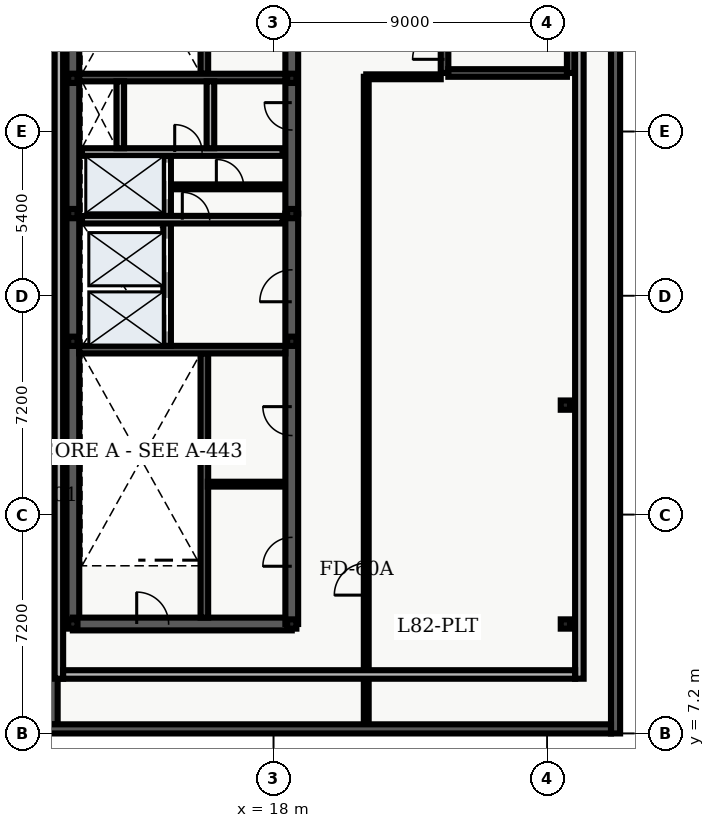
"""IFC4 building model, lengths in metres.
Left out: names, types, materials, properties, quantities, classifications, styles, units other than length and angle.
Written with IfcOpenShell. Run it as: python <this file> out.ifc"""

import sys

from ifc_helpers import new_model, entity, si_unit, converted_unit, direction, frame, origin_with_axes, origin_2d_with_axis, place, context, subcontext, project, spatial, polyline, rectangle, hollow_rectangle, outline, extrude, element, fill, save


model = new_model("IFC4")
c1 = context("Model", 3, precision=1e-05, world=origin_with_axes(), true_north=direction((0.0, 1.0)))
c2 = subcontext(c1, "Body", "Model", "MODEL_VIEW")
j1 = project(units=[si_unit("LENGTHUNIT", "METRE"), converted_unit("PLANEANGLEUNIT", "DEGREE", entity("IfcPlaneAngleMeasure", 0.017), si_unit("PLANEANGLEUNIT", "RADIAN"), dimensions=[0, 0, 0, 0, 0, 0, 0])], contexts=[c1])
p1 = place(None, origin_with_axes())
s1 = spatial("IfcSite", under=j1, at=p1, CompositionType="ELEMENT")
p2 = place(p1, origin_with_axes())
s2 = spatial("IfcBuilding", under=s1, at=p2, CompositionType="ELEMENT")
p3 = place(p2, frame((0.0, 0.0, 332.1), z_axis=(0.0, 0.0, 1.0), x_axis=(1.0, 0.0, 0.0)))
s3 = spatial("IfcBuildingStorey", under=s2, at=p3, CompositionType="ELEMENT", Elevation=332.1)
p4 = place(p3, frame((11.4, 10.8, 0.0), z_axis=(0.0, 0.0, 1.0), x_axis=(0.0, 1.0, 0.0)))
e1 = element("IfcWall", 1, at=p4, inside=s3, PredefinedType="SHEAR", context=c2, shape_type="SweptSolid", body=[
    extrude(outline(polyline([(0.0, -0.21), (27.0, -0.21), (27.0, 0.21), (0.0, 0.21), (0.0, -0.21)])), origin_with_axes(), (0.0, 0.0, 1.0), 3.64),
])
p5 = place(p3, frame((11.4, 10.8, 0.0), z_axis=(0.0, 0.0, 1.0), x_axis=(1.0, 0.0, 0.0)))
e2 = element("IfcWall", 2, at=p5, inside=s3, PredefinedType="SHEAR", context=c2, shape_type="SweptSolid", body=[
    extrude(outline(polyline([(0.0, -0.21), (7.2, -0.21), (7.2, 0.21), (0.0, 0.21), (0.0, -0.21)])), origin_with_axes(), (0.0, 0.0, 1.0), 3.64),
])
p6 = place(p5, frame((2.625, 0.0, 0.0), z_axis=(0.0, 0.0, 1.0), x_axis=(1.0, 0.0, 0.0)))
e3 = element("IfcOpeningElement", 3, at=p6, cuts=e2, PredefinedType="OPENING", context=c2, shape_type="SweptSolid", body=[
    extrude(rectangle(XDim=1.05, YDim=0.44, at=origin_2d_with_axis()), origin_with_axes(), (0.0, 0.0, 1.0), 2.15),
])
p7 = place(p3, frame((18.6, 10.8, 0.0), z_axis=(0.0, 0.0, 1.0), x_axis=(0.0, 1.0, 0.0)))
e4 = element("IfcWall", 4, at=p7, inside=s3, PredefinedType="SHEAR", context=c2, shape_type="SweptSolid", body=[
    extrude(outline(polyline([(0.0, -0.21), (13.5, -0.21), (13.5, 0.21), (0.0, 0.21), (0.0, -0.21)])), origin_with_axes(), (0.0, 0.0, 1.0), 3.64),
])
p8 = place(p7, frame((11.125, 0.0, 0.0), z_axis=(0.0, 0.0, 1.0), x_axis=(1.0, 0.0, 0.0)))
e5 = element("IfcOpeningElement", 5, at=p8, cuts=e4, PredefinedType="OPENING", context=c2, shape_type="SweptSolid", body=[
    extrude(rectangle(XDim=1.05, YDim=0.44, at=origin_2d_with_axis()), origin_with_axes(), (0.0, 0.0, 1.0), 2.15),
])
p9 = place(p7, frame((2.375, 0.0, 0.0), z_axis=(0.0, 0.0, 1.0), x_axis=(1.0, 0.0, 0.0)))
e6 = element("IfcOpeningElement", 6, at=p9, cuts=e4, PredefinedType="OPENING", context=c2, shape_type="SweptSolid", body=[
    extrude(rectangle(XDim=0.95, YDim=0.44, at=origin_2d_with_axis()), origin_with_axes(), (0.0, 0.0, 1.0), 2.15),
])
p10 = place(p7, frame((6.675, 0.0, 0.0), z_axis=(0.0, 0.0, 1.0), x_axis=(1.0, 0.0, 0.0)))
e7 = element("IfcOpeningElement", 7, at=p10, cuts=e4, PredefinedType="OPENING", context=c2, shape_type="SweptSolid", body=[
    extrude(rectangle(XDim=0.95, YDim=0.44, at=origin_2d_with_axis()), origin_with_axes(), (0.0, 0.0, 1.0), 2.15),
])
p11 = place(p3, frame((18.6, 24.3, 0.0), z_axis=(0.0, 0.0, 1.0), x_axis=(0.0, 1.0, 0.0)))
e8 = element("IfcWall", 8, at=p11, inside=s3, PredefinedType="SHEAR", context=c2, shape_type="SweptSolid", body=[
    extrude(outline(polyline([(0.0, -0.21), (13.5, -0.21), (13.5, 0.21), (0.0, 0.21), (0.0, -0.21)])), origin_with_axes(), (0.0, 0.0, 1.0), 3.64),
])
p12 = place(p11, frame((3.2, 0.0, 0.0), z_axis=(0.0, 0.0, 1.0), x_axis=(1.0, 0.0, 0.0)))
e9 = element("IfcOpeningElement", 9, at=p12, cuts=e8, PredefinedType="OPENING", context=c2, shape_type="SweptSolid", body=[
    extrude(rectangle(XDim=0.9, YDim=0.44, at=origin_2d_with_axis()), origin_with_axes(), (0.0, 0.0, 1.0), 2.15),
])
p13 = place(p11, frame((6.275, 0.0, 0.0), z_axis=(0.0, 0.0, 1.0), x_axis=(1.0, 0.0, 0.0)))
e10 = element("IfcOpeningElement", 10, at=p13, cuts=e8, PredefinedType="OPENING", context=c2, shape_type="SweptSolid", body=[
    extrude(rectangle(XDim=0.95, YDim=0.44, at=origin_2d_with_axis()), origin_with_axes(), (0.0, 0.0, 1.0), 2.15),
])
p14 = place(p11, frame((10.875, 0.0, 0.0), z_axis=(0.0, 0.0, 1.0), x_axis=(1.0, 0.0, 0.0)))
e11 = element("IfcOpeningElement", 11, at=p14, cuts=e8, PredefinedType="OPENING", context=c2, shape_type="SweptSolid", body=[
    extrude(rectangle(XDim=0.95, YDim=0.44, at=origin_2d_with_axis()), origin_with_axes(), (0.0, 0.0, 1.0), 2.15),
])
p15 = place(p3, frame((15.725, 11.01, 0.0), z_axis=(0.0, 0.0, 1.0), x_axis=(0.0, 1.0, 0.0)))
e12 = element("IfcWall", 12, at=p15, inside=s3, PredefinedType="SHEAR", context=c2, shape_type="SweptSolid", body=[
    extrude(outline(polyline([(0.0, -0.125), (8.69, -0.125), (8.69, 0.125), (0.0, 0.125), (0.0, -0.125)])), origin_with_axes(), (0.0, 0.0, 1.0), 3.64),
])
p16 = place(p3, frame((11.61, 19.825, 0.0), z_axis=(0.0, 0.0, 1.0), x_axis=(1.0, 0.0, 0.0)))
e13 = element("IfcWall", 13, at=p16, inside=s3, PredefinedType="SHEAR", context=c2, shape_type="SweptSolid", body=[
    extrude(outline(polyline([(0.0, -0.125), (6.78, -0.125), (6.78, 0.125), (0.0, 0.125), (0.0, -0.125)])), origin_with_axes(), (0.0, 0.0, 1.0), 3.64),
])
p17 = place(p3, frame((15.725, 28.9, 0.0), z_axis=(0.0, 0.0, 1.0), x_axis=(0.0, 1.0, 0.0)))
e14 = element("IfcWall", 14, at=p17, inside=s3, PredefinedType="SHEAR", context=c2, shape_type="SweptSolid", body=[
    extrude(outline(polyline([(0.0, -0.125), (8.69, -0.125), (8.69, 0.125), (0.0, 0.125), (0.0, -0.125)])), origin_with_axes(), (0.0, 0.0, 1.0), 3.64),
])
p18 = place(p3, frame((11.61, 28.775, 0.0), z_axis=(0.0, 0.0, 1.0), x_axis=(1.0, 0.0, 0.0)))
e15 = element("IfcWall", 15, at=p18, inside=s3, PredefinedType="SHEAR", context=c2, shape_type="SweptSolid", body=[
    extrude(outline(polyline([(0.0, -0.125), (6.78, -0.125), (6.78, 0.125), (0.0, 0.125), (0.0, -0.125)])), origin_with_axes(), (0.0, 0.0, 1.0), 3.64),
])
p19 = place(p3, frame((14.5, 19.95, 0.0), z_axis=(0.0, 0.0, 1.0), x_axis=(0.0, 1.0, 0.0)))
e16 = element("IfcWall", 16, at=p19, inside=s3, PredefinedType="SOLIDWALL", context=c2, shape_type="SweptSolid", body=[
    extrude(outline(polyline([(0.0, -0.125), (6.25, -0.125), (6.25, 0.125), (0.0, 0.125), (0.0, -0.125)])), origin_with_axes(), (0.0, 0.0, 1.0), 2.68),
])
p20 = place(p19, frame((1.025, 0.0, 0.0), z_axis=(0.0, 0.0, 1.0), x_axis=(1.0, 0.0, 0.0)))
e17 = element("IfcOpeningElement", 17, at=p20, cuts=e16, PredefinedType="OPENING", context=c2, shape_type="SweptSolid", body=[
    extrude(rectangle(XDim=1.1, YDim=0.27, at=origin_2d_with_axis()), origin_with_axes(), (0.0, 0.0, 1.0), 2.15),
])
p21 = place(p19, frame((2.975, 0.0, 0.0), z_axis=(0.0, 0.0, 1.0), x_axis=(1.0, 0.0, 0.0)))
e18 = element("IfcOpeningElement", 18, at=p21, cuts=e16, PredefinedType="OPENING", context=c2, shape_type="SweptSolid", body=[
    extrude(rectangle(XDim=1.1, YDim=0.27, at=origin_2d_with_axis()), origin_with_axes(), (0.0, 0.0, 1.0), 2.15),
])
p22 = place(p19, frame((5.425, 0.0, 0.0), z_axis=(0.0, 0.0, 1.0), x_axis=(1.0, 0.0, 0.0)))
e19 = element("IfcOpeningElement", 19, at=p22, cuts=e16, PredefinedType="OPENING", context=c2, shape_type="SweptSolid", body=[
    extrude(rectangle(XDim=1.2, YDim=0.27, at=origin_2d_with_axis()), origin_with_axes(), (0.0, 0.0, 1.0), 2.15),
])
p23 = place(p3, frame((11.7, 24.1, 0.0), z_axis=(0.0, 0.0, 1.0), x_axis=(1.0, 0.0, 0.0)))
e20 = element("IfcWall", 20, at=p23, inside=s3, PredefinedType="SOLIDWALL", context=c2, shape_type="SweptSolid", body=[
    extrude(outline(polyline([(0.0, -0.125), (6.6, -0.125), (6.6, 0.125), (0.0, 0.125), (0.0, -0.125)])), origin_with_axes(), (0.0, 0.0, 1.0), 2.68),
])
p24 = place(p23, frame((3.75, 0.0, 0.0), z_axis=(0.0, 0.0, 1.0), x_axis=(1.0, 0.0, 0.0)))
e21 = element("IfcOpeningElement", 21, at=p24, cuts=e20, PredefinedType="OPENING", context=c2, shape_type="SweptSolid", body=[
    extrude(rectangle(XDim=0.9, YDim=0.27, at=origin_2d_with_axis()), origin_with_axes(), (0.0, 0.0, 1.0), 2.15),
])
p25 = place(p3, frame((11.7, 26.325, 0.0), z_axis=(0.0, 0.0, 1.0), x_axis=(1.0, 0.0, 0.0)))
e22 = element("IfcWall", 22, at=p25, inside=s3, PredefinedType="SOLIDWALL", context=c2, shape_type="SweptSolid", body=[
    extrude(outline(polyline([(0.0, -0.125), (6.6, -0.125), (6.6, 0.125), (0.0, 0.125), (0.0, -0.125)])), origin_with_axes(), (0.0, 0.0, 1.0), 2.68),
])
p26 = place(p25, frame((3.5, 0.0, 0.0), z_axis=(0.0, 0.0, 1.0), x_axis=(1.0, 0.0, 0.0)))
e23 = element("IfcOpeningElement", 23, at=p26, cuts=e22, PredefinedType="OPENING", context=c2, shape_type="SweptSolid", body=[
    extrude(rectangle(XDim=0.9, YDim=0.27, at=origin_2d_with_axis()), origin_with_axes(), (0.0, 0.0, 1.0), 2.15),
])
for number, where, z_axis, x_axis in (
    (24, (12.96, 26.45, 0.0), (0.0, 0.0, 1.0), (0.0, 1.0, 0.0)),
    (25, (15.925, 26.45, 0.0), (0.0, 0.0, 1.0), (0.0, 1.0, 0.0)),
):
    element("IfcWall", number, at=place(p3, frame(where, z_axis=z_axis, x_axis=x_axis)), inside=s3, PredefinedType="SOLIDWALL", context=c2, shape_type="SweptSolid", body=[
        extrude(outline(polyline([(0.0, -0.125), (2.2, -0.125), (2.2, 0.125), (0.0, 0.125), (0.0, -0.125)])), origin_with_axes(), (0.0, 0.0, 1.0), 2.68),
    ])
p27 = place(p3, frame((23.625, 28.925, 0.0), z_axis=(0.0, 0.0, 1.0), x_axis=(0.0, 1.0, 0.0)))
e26 = element("IfcWall", 26, at=p27, inside=s3, PredefinedType="SHEAR", context=c2, shape_type="SweptSolid", body=[
    extrude(outline(polyline([(0.0, -0.125), (8.65, -0.125), (8.65, 0.125), (0.0, 0.125), (0.0, -0.125)])), origin_with_axes(), (0.0, 0.0, 1.0), 3.64),
])
p28 = place(p27, frame((0.975, 0.0, 0.0), z_axis=(0.0, 0.0, 1.0), x_axis=(1.0, 0.0, 0.0)))
e27 = element("IfcOpeningElement", 27, at=p28, cuts=e26, PredefinedType="OPENING", context=c2, shape_type="SweptSolid", body=[
    extrude(rectangle(XDim=1.05, YDim=0.27, at=origin_2d_with_axis()), origin_with_axes(), (0.0, 0.0, 1.0), 2.15),
])
p29 = place(p3, frame((27.775, 28.925, 0.0), z_axis=(0.0, 0.0, 1.0), x_axis=(0.0, 1.0, 0.0)))
e28 = element("IfcWall", 28, at=p29, inside=s3, PredefinedType="SHEAR", context=c2, shape_type="SweptSolid", body=[
    extrude(outline(polyline([(0.0, -0.125), (8.65, -0.125), (8.65, 0.125), (0.0, 0.125), (0.0, -0.125)])), origin_with_axes(), (0.0, 0.0, 1.0), 3.64),
])
p30 = place(p3, frame((23.75, 28.925, 0.0), z_axis=(0.0, 0.0, 1.0), x_axis=(1.0, 0.0, 0.0)))
e29 = element("IfcWall", 29, at=p30, inside=s3, PredefinedType="SHEAR", context=c2, shape_type="SweptSolid", body=[
    extrude(outline(polyline([(0.0, -0.125), (3.9, -0.125), (3.9, 0.125), (0.0, 0.125), (0.0, -0.125)])), origin_with_axes(), (0.0, 0.0, 1.0), 3.64),
])
for number, where, z_axis, x_axis in (
    (30, (11.4, 10.8, 0.0), (0.0, 0.0, 1.0), (1.0, 0.0, 0.0)),
    (31, (11.4, 20.1, 0.0), (0.0, 0.0, 1.0), (1.0, 0.0, 0.0)),
    (32, (11.4, 24.3, 0.0), (0.0, 0.0, 1.0), (1.0, 0.0, 0.0)),
    (33, (11.4, 28.75, 0.0), (0.0, 0.0, 1.0), (1.0, 0.0, 0.0)),
    (34, (18.6, 10.8, 0.0), (0.0, 0.0, 1.0), (1.0, 0.0, 0.0)),
    (35, (18.6, 20.1, 0.0), (0.0, 0.0, 1.0), (1.0, 0.0, 0.0)),
    (36, (18.6, 24.3, 0.0), (0.0, 0.0, 1.0), (1.0, 0.0, 0.0)),
    (37, (18.6, 28.75, 0.0), (0.0, 0.0, 1.0), (1.0, 0.0, 0.0)),
    (38, (27.6, 10.8, 0.0), (0.0, 0.0, 1.0), (1.0, 0.0, 0.0)),
    (39, (27.6, 18.0, 0.0), (0.0, 0.0, 1.0), (1.0, 0.0, 0.0)),
):
    element("IfcColumn", number, at=place(p3, frame(where, z_axis=z_axis, x_axis=x_axis)), inside=s3, PredefinedType="COLUMN", context=c2, shape_type="SweptSolid", body=[
        extrude(hollow_rectangle(XDim=0.305, YDim=0.305, WallThickness=0.015, InnerFilletRadius=0.015, OuterFilletRadius=0.03, at=origin_2d_with_axis()), origin_with_axes(), (0.0, 0.0, 1.0), 3.783),
    ])
p31 = place(p3, frame((14.62, 25.18, 0.0), z_axis=(0.0, 0.0, 1.0), x_axis=(1.0, 0.0, 0.0)))
e40 = element("IfcWall", 40, at=p31, inside=s3, PredefinedType="PARTITIONING", context=c2, shape_type="SweptSolid", body=[
    extrude(outline(polyline([(0.0, -0.08), (3.68, -0.08), (3.68, 0.08), (0.0, 0.08), (0.0, -0.08)])), origin_with_axes(), (0.0, 0.0, 1.0), 2.68),
])
p32 = place(p31, frame((1.95, 0.0, 0.0), z_axis=(0.0, 0.0, 1.0), x_axis=(1.0, 0.0, 0.0)))
e41 = element("IfcOpeningElement", 41, at=p32, cuts=e40, PredefinedType="OPENING", context=c2, shape_type="SweptSolid", body=[
    extrude(rectangle(XDim=0.9, YDim=0.18, at=origin_2d_with_axis()), origin_with_axes(), (0.0, 0.0, 1.0), 2.15),
])
p33 = place(p3, frame((15.84, 15.4, 0.0), z_axis=(0.0, 0.0, 1.0), x_axis=(1.0, 0.0, 0.0)))
e42 = element("IfcWall", 42, at=p33, inside=s3, PredefinedType="PARTITIONING", context=c2, shape_type="SweptSolid", body=[
    extrude(outline(polyline([(0.0, -0.08), (2.46, -0.08), (2.46, 0.08), (0.0, 0.08), (0.0, -0.08)])), origin_with_axes(), (0.0, 0.0, 1.0), 2.68),
])
p34 = place(p3, frame((21.05, 7.495, 0.0), z_axis=(0.0, 0.0, 1.0), x_axis=(0.0, 1.0, 0.0)))
e43 = element("IfcWall", 43, at=p34, inside=s3, PredefinedType="PARTITIONING", context=c2, shape_type="SweptSolid", body=[
    extrude(outline(polyline([(0.0, -0.08), (21.305, -0.08), (21.305, 0.08), (0.0, 0.08), (0.0, -0.08)])), origin_with_axes(), (0.0, 0.0, 1.0), 2.68),
])
p35 = place(p34, frame((4.78, 0.0, 0.0), z_axis=(0.0, 0.0, 1.0), x_axis=(1.0, 0.0, 0.0)))
e44 = element("IfcOpeningElement", 44, at=p35, cuts=e43, PredefinedType="OPENING", context=c2, shape_type="SweptSolid", body=[
    extrude(rectangle(XDim=1.05, YDim=0.18, at=origin_2d_with_axis()), origin_with_axes(), (0.0, 0.0, 1.0), 2.15),
])
p36 = place(p3, frame((21.05, 28.8, 0.0), z_axis=(0.0, 0.0, 1.0), x_axis=(1.0, 0.0, 0.0)))
e45 = element("IfcWall", 45, at=p36, inside=s3, PredefinedType="PARTITIONING", context=c2, shape_type="SweptSolid", body=[
    extrude(outline(polyline([(0.0, -0.08), (2.45, -0.08), (2.45, 0.08), (0.0, 0.08), (0.0, -0.08)])), origin_with_axes(), (0.0, 0.0, 1.0), 2.68),
])
for number, where, z_axis, x_axis in (
    (46, (10.75, 7.5, 0.0), (0.0, 0.0, 1.0), (0.0, 1.0, 0.0)),
    (47, (29.25, 41.1, 0.0), (0.0, 0.0, 1.0), (0.0, -1.0, 0.0)),
):
    element("IfcWall", number, at=place(p3, frame(where, z_axis=z_axis, x_axis=x_axis)), inside=s3, PredefinedType="SOLIDWALL", context=c2, shape_type="SweptSolid", body=[
        extrude(outline(polyline([(0.0, -0.15), (33.9, -0.15), (33.9, 0.15), (0.0, 0.15), (0.0, -0.15)])), origin_with_axes(), (0.0, 0.0, 1.0), 3.64),
    ])
p37 = place(p3, frame((29.1, 7.35, 0.0), z_axis=(0.0, 0.0, 1.0), x_axis=(-1.0, 0.0, 0.0)))
e48 = element("IfcWall", 48, at=p37, inside=s3, PredefinedType="SOLIDWALL", context=c2, shape_type="SweptSolid", body=[
    extrude(outline(polyline([(0.0, -0.15), (18.5, -0.15), (18.5, 0.15), (0.0, 0.15), (0.0, -0.15)])), origin_with_axes(), (0.0, 0.0, 1.0), 3.64),
])
for number, where, z_axis, x_axis in (
    (49, (28.06, 39.6, 3.9), (0.0, 0.0, 1.0), (0.0, -1.0, 0.0)),
    (50, (10.94, 9.0, 3.9), (0.0, 0.0, 1.0), (0.0, 1.0, 0.0)),
):
    element("IfcWall", number, at=place(p3, frame(where, z_axis=z_axis, x_axis=x_axis)), inside=s3, PredefinedType="PARAPET", context=c2, shape_type="SweptSolid", body=[
        extrude(outline(polyline([(0.0, -0.14), (30.6, -0.14), (30.6, 0.14), (0.0, 0.14), (0.0, -0.14)])), origin_with_axes(), (0.0, 0.0, 1.0), 1.2),
    ])
p38 = place(p3, frame((27.92, 9.14, 3.9), z_axis=(0.0, 0.0, 1.0), x_axis=(-1.0, 0.0, 0.0)))
e51 = element("IfcWall", 51, at=p38, inside=s3, PredefinedType="PARAPET", context=c2, shape_type="SweptSolid", body=[
    extrude(outline(polyline([(0.0, -0.14), (16.84, -0.14), (16.84, 0.14), (0.0, 0.14), (0.0, -0.14)])), origin_with_axes(), (0.0, 0.0, 1.0), 1.2),
])
p39 = place(p19, frame((1.025, 0.0, 0.0), z_axis=(0.0, 0.0, 1.0), x_axis=(1.0, 0.0, 0.0)))
e52 = element("IfcDoor", 52, at=p39, inside=s3, OperationType="SLIDING_TO_LEFT", PredefinedType="DOOR", context=c2, shape_type="SweptSolid", body=[
    extrude(rectangle(XDim=1.1, YDim=0.09, at=origin_2d_with_axis()), origin_with_axes(), (0.0, 0.0, 1.0), 2.15),
])
fill(e17, e52)
p40 = place(p19, frame((2.975, 0.0, 0.0), z_axis=(0.0, 0.0, 1.0), x_axis=(1.0, 0.0, 0.0)))
e53 = element("IfcDoor", 53, at=p40, inside=s3, OperationType="SLIDING_TO_RIGHT", PredefinedType="DOOR", context=c2, shape_type="SweptSolid", body=[
    extrude(rectangle(XDim=1.1, YDim=0.09, at=origin_2d_with_axis()), origin_with_axes(), (0.0, 0.0, 1.0), 2.15),
])
fill(e18, e53)
p41 = place(p19, frame((5.425, 0.0, 0.0), z_axis=(0.0, 0.0, 1.0), x_axis=(1.0, 0.0, 0.0)))
e54 = element("IfcDoor", 54, at=p41, inside=s3, OperationType="DOUBLE_DOOR_SLIDING", PredefinedType="DOOR", context=c2, shape_type="SweptSolid", body=[
    extrude(rectangle(XDim=1.2, YDim=0.09, at=origin_2d_with_axis()), origin_with_axes(), (0.0, 0.0, 1.0), 2.15),
])
fill(e19, e54)
p42 = place(p11, frame((3.2, 0.0, 0.0), z_axis=(0.0, 0.0, 1.0), x_axis=(1.0, 0.0, 0.0)))
e55 = element("IfcDoor", 55, at=p42, inside=s3, OperationType="SINGLE_SWING_RIGHT", PredefinedType="DOOR", context=c2, shape_type="SweptSolid", body=[
    extrude(rectangle(XDim=0.9, YDim=0.09, at=origin_2d_with_axis()), origin_with_axes(), (0.0, 0.0, 1.0), 2.15),
])
fill(e9, e55)
p43 = place(p5, frame((2.625, 0.0, 0.0), z_axis=(0.0, 0.0, 1.0), x_axis=(1.0, 0.0, 0.0)))
e56 = element("IfcDoor", 56, at=p43, inside=s3, OperationType="SINGLE_SWING_LEFT", PredefinedType="DOOR", context=c2, shape_type="SweptSolid", body=[
    extrude(rectangle(XDim=1.05, YDim=0.09, at=origin_2d_with_axis()), origin_with_axes(), (0.0, 0.0, 1.0), 2.15),
])
fill(e3, e56)
p44 = place(p7, frame((11.125, 0.0, 0.0), z_axis=(0.0, 0.0, 1.0), x_axis=(1.0, 0.0, 0.0)))
e57 = element("IfcDoor", 57, at=p44, inside=s3, OperationType="SINGLE_SWING_LEFT", PredefinedType="DOOR", context=c2, shape_type="SweptSolid", body=[
    extrude(rectangle(XDim=1.05, YDim=0.09, at=origin_2d_with_axis()), origin_with_axes(), (0.0, 0.0, 1.0), 2.15),
])
fill(e5, e57)
p45 = place(p25, frame((3.5, 0.0, 0.0), z_axis=(0.0, 0.0, 1.0), x_axis=(1.0, 0.0, 0.0)))
e58 = element("IfcDoor", 58, at=p45, inside=s3, OperationType="SINGLE_SWING_LEFT", PredefinedType="DOOR", context=c2, shape_type="SweptSolid", body=[
    extrude(rectangle(XDim=0.9, YDim=0.09, at=origin_2d_with_axis()), origin_with_axes(), (0.0, 0.0, 1.0), 2.15),
])
fill(e23, e58)
p46 = place(p23, frame((3.75, 0.0, 0.0), z_axis=(0.0, 0.0, 1.0), x_axis=(1.0, 0.0, 0.0)))
e59 = element("IfcDoor", 59, at=p46, inside=s3, OperationType="SINGLE_SWING_LEFT", PredefinedType="DOOR", context=c2, shape_type="SweptSolid", body=[
    extrude(rectangle(XDim=0.9, YDim=0.09, at=origin_2d_with_axis()), origin_with_axes(), (0.0, 0.0, 1.0), 2.15),
])
fill(e21, e59)
p47 = place(p31, frame((1.95, 0.0, 0.0), z_axis=(0.0, 0.0, 1.0), x_axis=(1.0, 0.0, 0.0)))
e60 = element("IfcDoor", 60, at=p47, inside=s3, OperationType="SINGLE_SWING_LEFT", PredefinedType="DOOR", context=c2, shape_type="SweptSolid", body=[
    extrude(rectangle(XDim=0.9, YDim=0.09, at=origin_2d_with_axis()), origin_with_axes(), (0.0, 0.0, 1.0), 2.15),
])
fill(e41, e60)
p48 = place(p7, frame((2.375, 0.0, 0.0), z_axis=(0.0, 0.0, 1.0), x_axis=(1.0, 0.0, 0.0)))
e61 = element("IfcDoor", 61, at=p48, inside=s3, OperationType="SINGLE_SWING_LEFT", PredefinedType="DOOR", context=c2, shape_type="SweptSolid", body=[
    extrude(rectangle(XDim=0.95, YDim=0.09, at=origin_2d_with_axis()), origin_with_axes(), (0.0, 0.0, 1.0), 2.15),
])
fill(e6, e61)
p49 = place(p7, frame((6.675, 0.0, 0.0), z_axis=(0.0, 0.0, 1.0), x_axis=(1.0, 0.0, 0.0)))
e62 = element("IfcDoor", 62, at=p49, inside=s3, OperationType="SINGLE_SWING_RIGHT", PredefinedType="DOOR", context=c2, shape_type="SweptSolid", body=[
    extrude(rectangle(XDim=0.95, YDim=0.09, at=origin_2d_with_axis()), origin_with_axes(), (0.0, 0.0, 1.0), 2.15),
])
fill(e7, e62)
p50 = place(p27, frame((0.975, 0.0, 0.0), z_axis=(0.0, 0.0, 1.0), x_axis=(1.0, 0.0, 0.0)))
e63 = element("IfcDoor", 63, at=p50, inside=s3, OperationType="SINGLE_SWING_LEFT", PredefinedType="DOOR", context=c2, shape_type="SweptSolid", body=[
    extrude(rectangle(XDim=1.05, YDim=0.09, at=origin_2d_with_axis()), origin_with_axes(), (0.0, 0.0, 1.0), 2.15),
])
fill(e27, e63)
p51 = place(p34, frame((4.78, 0.0, 0.0), z_axis=(0.0, 0.0, 1.0), x_axis=(1.0, 0.0, 0.0)))
e64 = element("IfcDoor", 64, at=p51, inside=s3, OperationType="SINGLE_SWING_LEFT", PredefinedType="DOOR", context=c2, shape_type="SweptSolid", body=[
    extrude(rectangle(XDim=1.05, YDim=0.09, at=origin_2d_with_axis()), origin_with_axes(), (0.0, 0.0, 1.0), 2.15),
])
fill(e44, e64)
save(model, sys.argv[1])
